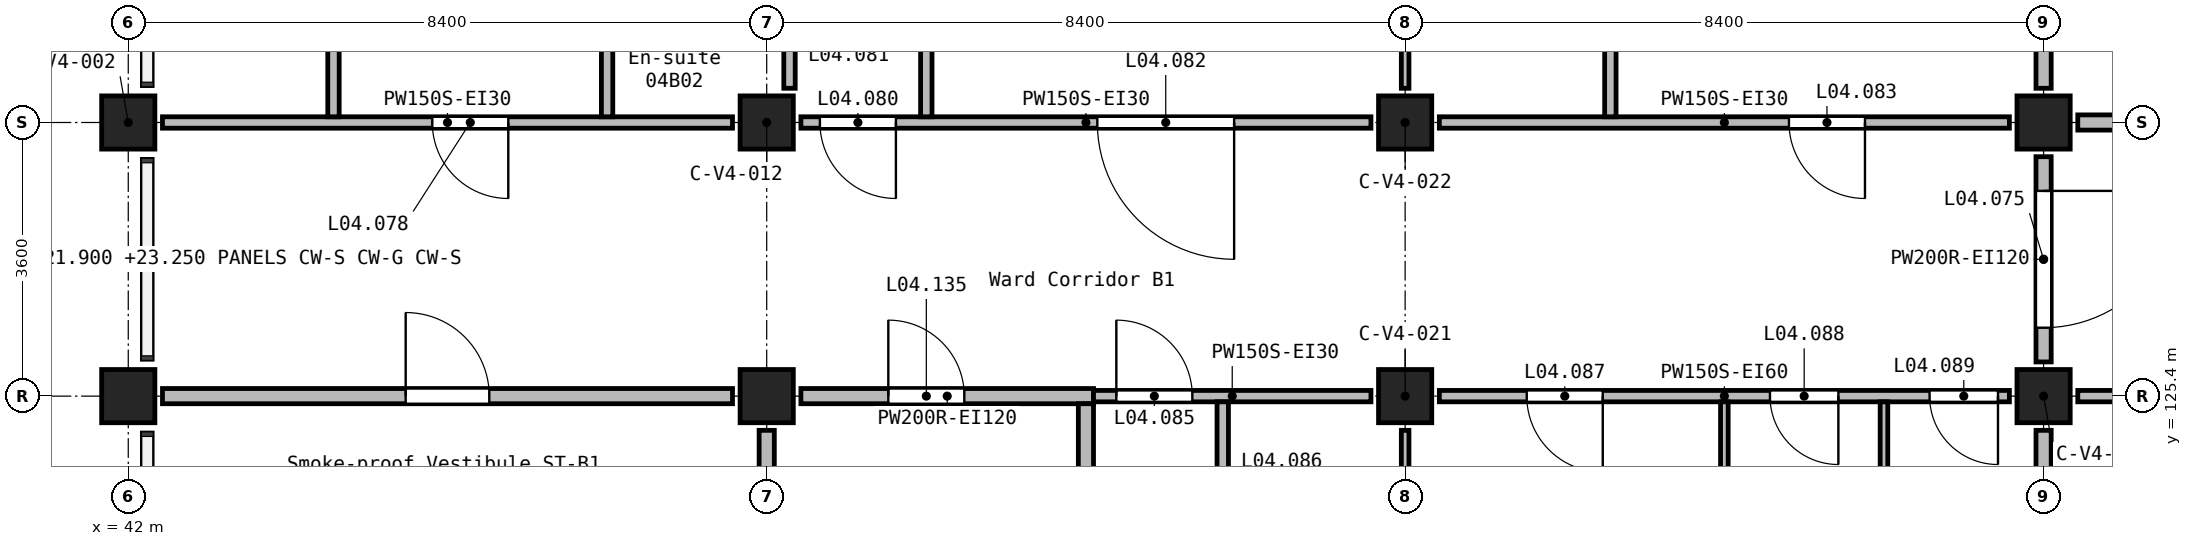
"""IFC4 building model, lengths in metres.
Left out: names, types, materials, properties, quantities, classifications, styles, units other than length and angle.
Written with IfcOpenShell. Run it as: python <this file> out.ifc"""

import sys

from ifc_helpers import new_model, si_unit, direction, frame, frame_2d, origin, origin_2d, place, context, subcontext, project, spatial, rectangle, extrude, element, fill, save


model = new_model("IFC4")
c1 = context("Model", 3, precision=1e-05, world=origin(), true_north=direction((0.0, 1.0)))
c2 = subcontext(c1, "Body", "Model", "MODEL_VIEW")
j1 = project(units=[si_unit("LENGTHUNIT", "METRE"), si_unit("PLANEANGLEUNIT", "RADIAN")], contexts=[c1])
p1 = place(None, origin())
s1 = spatial("IfcSite", under=j1, at=p1, CompositionType="ELEMENT")
p2 = place(p1, origin())
s2 = spatial("IfcBuilding", under=s1, at=p2, CompositionType="ELEMENT")
p3 = place(p2, frame((0.0, 0.0, 21.0)))
s3 = spatial("IfcBuildingStorey", under=s2, at=p3, CompositionType="ELEMENT", Elevation=21.0)
for number, where, z_axis, x_axis in (
    (1, (42.0, 125.4, 0.0), (0.0, 0.0, 1.0), (1.0, 0.0, 0.0)),
    (2, (42.0, 129.0, 0.0), (0.0, 0.0, 1.0), (1.0, 0.0, 0.0)),
    (3, (50.4, 125.4, 0.0), (0.0, 0.0, 1.0), (1.0, 0.0, 0.0)),
    (4, (50.4, 129.0, 0.0), (0.0, 0.0, 1.0), (1.0, 0.0, 0.0)),
    (5, (58.8, 125.4, 0.0), (0.0, 0.0, 1.0), (1.0, 0.0, 0.0)),
    (6, (58.8, 129.0, 0.0), (0.0, 0.0, 1.0), (1.0, 0.0, 0.0)),
    (7, (67.2, 125.4, 0.0), (0.0, 0.0, 1.0), (1.0, 0.0, 0.0)),
    (8, (67.2, 129.0, 0.0), (0.0, 0.0, 1.0), (1.0, 0.0, 0.0)),
):
    element("IfcColumn", number, at=place(p3, frame(where, z_axis=z_axis, x_axis=x_axis)), inside=s3, PredefinedType="COLUMN", context=c2, shape_type="SweptSolid", body=[
        extrude(rectangle(XDim=0.7, YDim=0.7, at=origin_2d()), origin(), (0.0, 0.0, 1.0), 3.9),
    ])
p4 = place(p3, frame((67.2, 131.425, 0.0), z_axis=(0.0, 0.0, 1.0), x_axis=(0.0, -1.0, 0.0)))
e9 = element("IfcWall", 9, at=p4, inside=s3, PredefinedType="SOLIDWALL", context=c2, shape_type="SweptSolid", body=[
    extrude(rectangle(XDim=1.975, YDim=0.2, at=frame_2d((0.988, 0.0))), origin(), (0.0, 0.0, 1.0), 3.6),
])
p5 = place(p3, frame((67.2, 128.55, 0.0), z_axis=(0.0, 0.0, 1.0), x_axis=(0.0, -1.0, 0.0)))
e10 = element("IfcWall", 10, at=p5, inside=s3, PredefinedType="SOLIDWALL", context=c2, shape_type="SweptSolid", body=[
    extrude(rectangle(XDim=2.7, YDim=0.2, at=frame_2d((1.35, 0.0))), origin(), (0.0, 0.0, 1.0), 3.6),
])
p6 = place(p5, frame((0.45, 0.0, 0.0)))
e11 = element("IfcOpeningElement", 11, at=p6, cuts=e10, PredefinedType="OPENING", context=c2, shape_type="SweptSolid", body=[
    extrude(rectangle(XDim=1.8, YDim=2.1, at=frame_2d((0.9, 1.05))), frame((0.0, 0.11, 0.0), z_axis=(0.0, -1.0, 0.0), x_axis=(1.0, 0.0, 0.0)), (0.0, 0.0, 1.0), 0.22),
])
p7 = place(p3, frame((67.2, 124.95, 0.0), z_axis=(0.0, 0.0, 1.0), x_axis=(0.0, -1.0, 0.0)))
e12 = element("IfcWall", 12, at=p7, inside=s3, PredefinedType="SOLIDWALL", context=c2, shape_type="SweptSolid", body=[
    extrude(rectangle(XDim=6.9, YDim=0.2, at=frame_2d((3.45, 0.0))), origin(), (0.0, 0.0, 1.0), 3.6),
])
p8 = place(p3, frame((42.45, 125.4, 0.0), z_axis=(0.0, 0.0, 1.0), x_axis=(1.0, 0.0, 0.0)))
e13 = element("IfcWall", 13, at=p8, inside=s3, PredefinedType="SOLIDWALL", context=c2, shape_type="SweptSolid", body=[
    extrude(rectangle(XDim=7.5, YDim=0.2, at=frame_2d((3.75, 0.0))), origin(), (0.0, 0.0, 1.0), 3.6),
])
p9 = place(p8, frame((3.2, 0.0, 0.0)))
e14 = element("IfcOpeningElement", 14, at=p9, cuts=e13, PredefinedType="OPENING", context=c2, shape_type="SweptSolid", body=[
    extrude(rectangle(XDim=1.1, YDim=2.1, at=frame_2d((0.55, 1.05))), frame((0.0, 0.11, 0.0), z_axis=(0.0, -1.0, 0.0), x_axis=(1.0, 0.0, 0.0)), (0.0, 0.0, 1.0), 0.22),
])
p10 = place(p3, frame((50.85, 125.4, 0.0), z_axis=(0.0, 0.0, 1.0), x_axis=(1.0, 0.0, 0.0)))
e15 = element("IfcWall", 15, at=p10, inside=s3, PredefinedType="SOLIDWALL", context=c2, shape_type="SweptSolid", body=[
    extrude(rectangle(XDim=3.85, YDim=0.2, at=frame_2d((1.925, 0.0))), origin(), (0.0, 0.0, 1.0), 3.6),
])
p11 = place(p10, frame((1.15, 0.0, 0.0)))
e16 = element("IfcOpeningElement", 16, at=p11, cuts=e15, PredefinedType="OPENING", context=c2, shape_type="SweptSolid", body=[
    extrude(rectangle(XDim=1.0, YDim=2.1, at=frame_2d((0.5, 1.05))), frame((0.0, 0.11, 0.0), z_axis=(0.0, -1.0, 0.0), x_axis=(1.0, 0.0, 0.0)), (0.0, 0.0, 1.0), 0.22),
])
p12 = place(p3, frame((50.4, 123.175, 0.0), z_axis=(0.0, 0.0, 1.0), x_axis=(0.0, 1.0, 0.0)))
e17 = element("IfcWall", 17, at=p12, inside=s3, PredefinedType="SOLIDWALL", context=c2, shape_type="SweptSolid", body=[
    extrude(rectangle(XDim=1.775, YDim=0.2, at=frame_2d((0.887, 0.0))), origin(), (0.0, 0.0, 1.0), 3.6),
])
p13 = place(p3, frame((67.65, 129.0, 0.0), z_axis=(0.0, 0.0, 1.0), x_axis=(1.0, 0.0, 0.0)))
e18 = element("IfcWall", 18, at=p13, inside=s3, PredefinedType="SOLIDWALL", context=c2, shape_type="SweptSolid", body=[
    extrude(rectangle(XDim=7.5, YDim=0.2, at=frame_2d((3.75, 0.0))), origin(), (0.0, 0.0, 1.0), 3.6),
])
p14 = place(p13, frame((2.85, 0.0, 0.0)))
e19 = element("IfcOpeningElement", 19, at=p14, cuts=e18, PredefinedType="OPENING", context=c2, shape_type="SweptSolid", body=[
    extrude(rectangle(XDim=1.8, YDim=2.1, at=frame_2d((0.9, 1.05))), frame((0.0, 0.11, 0.0), z_axis=(0.0, -1.0, 0.0), x_axis=(1.0, 0.0, 0.0)), (0.0, 0.0, 1.0), 0.22),
])
p15 = place(p3, frame((54.6, 118.05, 0.0), z_axis=(0.0, 0.0, 1.0), x_axis=(0.0, 1.0, 0.0)))
e20 = element("IfcWall", 20, at=p15, inside=s3, PredefinedType="SOLIDWALL", context=c2, shape_type="SweptSolid", body=[
    extrude(rectangle(XDim=7.25, YDim=0.2, at=frame_2d((3.625, 0.0))), origin(), (0.0, 0.0, 1.0), 3.6),
])
p16 = place(p3, frame((66.75, 129.0, 0.0), z_axis=(0.0, 0.0, 1.0), x_axis=(-1.0, 0.0, 0.0)))
e21 = element("IfcWall", 21, at=p16, inside=s3, PredefinedType="PARTITIONING", context=c2, shape_type="SweptSolid", body=[
    extrude(rectangle(XDim=7.5, YDim=0.15, at=frame_2d((3.75, 0.0))), origin(), (0.0, 0.0, 1.0), 3.6),
])
p17 = place(p16, frame((1.9, 0.0, 0.0)))
e22 = element("IfcOpeningElement", 22, at=p17, cuts=e21, PredefinedType="OPENING", context=c2, shape_type="SweptSolid", body=[
    extrude(rectangle(XDim=1.0, YDim=2.1, at=frame_2d((0.5, 1.05))), frame((0.0, 0.085, 0.0), z_axis=(0.0, -1.0, 0.0), x_axis=(1.0, 0.0, 0.0)), (0.0, 0.0, 1.0), 0.17),
])
p18 = place(p3, frame((58.35, 129.0, 0.0), z_axis=(0.0, 0.0, 1.0), x_axis=(-1.0, 0.0, 0.0)))
e23 = element("IfcWall", 23, at=p18, inside=s3, PredefinedType="PARTITIONING", context=c2, shape_type="SweptSolid", body=[
    extrude(rectangle(XDim=7.5, YDim=0.15, at=frame_2d((3.75, 0.0))), origin(), (0.0, 0.0, 1.0), 3.6),
])
p19 = place(p18, frame((6.25, 0.0, 0.0)))
e24 = element("IfcOpeningElement", 24, at=p19, cuts=e23, PredefinedType="OPENING", context=c2, shape_type="SweptSolid", body=[
    extrude(rectangle(XDim=1.0, YDim=2.1, at=frame_2d((0.5, 1.05))), frame((0.0, 0.085, 0.0), z_axis=(0.0, -1.0, 0.0), x_axis=(1.0, 0.0, 0.0)), (0.0, 0.0, 1.0), 0.17),
])
p20 = place(p18, frame((1.8, 0.0, 0.0)))
e25 = element("IfcOpeningElement", 25, at=p20, cuts=e23, PredefinedType="OPENING", context=c2, shape_type="SweptSolid", body=[
    extrude(rectangle(XDim=1.8, YDim=2.1, at=frame_2d((0.9, 1.05))), frame((0.0, 0.085, 0.0), z_axis=(0.0, -1.0, 0.0), x_axis=(1.0, 0.0, 0.0)), (0.0, 0.0, 1.0), 0.17),
])
p21 = place(p3, frame((49.95, 129.0, 0.0), z_axis=(0.0, 0.0, 1.0), x_axis=(-1.0, 0.0, 0.0)))
e26 = element("IfcWall", 26, at=p21, inside=s3, PredefinedType="PARTITIONING", context=c2, shape_type="SweptSolid", body=[
    extrude(rectangle(XDim=7.5, YDim=0.15, at=frame_2d((3.75, 0.0))), origin(), (0.0, 0.0, 1.0), 3.6),
])
p22 = place(p21, frame((2.95, 0.0, 0.0)))
e27 = element("IfcOpeningElement", 27, at=p22, cuts=e26, PredefinedType="OPENING", context=c2, shape_type="SweptSolid", body=[
    extrude(rectangle(XDim=1.0, YDim=2.1, at=frame_2d((0.5, 1.05))), frame((0.0, 0.085, 0.0), z_axis=(0.0, -1.0, 0.0), x_axis=(1.0, 0.0, 0.0)), (0.0, 0.0, 1.0), 0.17),
])
p23 = place(p3, frame((66.75, 125.4, 0.0), z_axis=(0.0, 0.0, 1.0), x_axis=(-1.0, 0.0, 0.0)))
e28 = element("IfcWall", 28, at=p23, inside=s3, PredefinedType="PARTITIONING", context=c2, shape_type="SweptSolid", body=[
    extrude(rectangle(XDim=7.5, YDim=0.15, at=frame_2d((3.75, 0.0))), origin(), (0.0, 0.0, 1.0), 3.6),
])
p24 = place(p23, frame((5.35, 0.0, 0.0)))
e29 = element("IfcOpeningElement", 29, at=p24, cuts=e28, PredefinedType="OPENING", context=c2, shape_type="SweptSolid", body=[
    extrude(rectangle(XDim=1.0, YDim=2.1, at=frame_2d((0.5, 1.05))), frame((0.0, 0.085, 0.0), z_axis=(0.0, -1.0, 0.0), x_axis=(1.0, 0.0, 0.0)), (0.0, 0.0, 1.0), 0.17),
])
p25 = place(p23, frame((2.25, 0.0, 0.0)))
e30 = element("IfcOpeningElement", 30, at=p25, cuts=e28, PredefinedType="OPENING", context=c2, shape_type="SweptSolid", body=[
    extrude(rectangle(XDim=0.9, YDim=2.1, at=frame_2d((0.45, 1.05))), frame((0.0, 0.085, 0.0), z_axis=(0.0, -1.0, 0.0), x_axis=(1.0, 0.0, 0.0)), (0.0, 0.0, 1.0), 0.17),
])
p26 = place(p23, frame((0.15, 0.0, 0.0)))
e31 = element("IfcOpeningElement", 31, at=p26, cuts=e28, PredefinedType="OPENING", context=c2, shape_type="SweptSolid", body=[
    extrude(rectangle(XDim=0.9, YDim=2.1, at=frame_2d((0.45, 1.05))), frame((0.0, 0.085, 0.0), z_axis=(0.0, -1.0, 0.0), x_axis=(1.0, 0.0, 0.0)), (0.0, 0.0, 1.0), 0.17),
])
p27 = place(p3, frame((67.65, 125.4, 0.0), z_axis=(0.0, 0.0, 1.0), x_axis=(1.0, 0.0, 0.0)))
e32 = element("IfcWall", 32, at=p27, inside=s3, PredefinedType="PARTITIONING", context=c2, shape_type="SweptSolid", body=[
    extrude(rectangle(XDim=7.5, YDim=0.15, at=frame_2d((3.75, 0.0))), origin(), (0.0, 0.0, 1.0), 3.6),
])
p28 = place(p27, frame((4.6, 0.0, 0.0)))
e33 = element("IfcOpeningElement", 33, at=p28, cuts=e32, PredefinedType="OPENING", context=c2, shape_type="SweptSolid", body=[
    extrude(rectangle(XDim=1.0, YDim=2.1, at=frame_2d((0.5, 1.05))), frame((0.0, 0.085, 0.0), z_axis=(0.0, -1.0, 0.0), x_axis=(1.0, 0.0, 0.0)), (0.0, 0.0, 1.0), 0.17),
])
p29 = place(p3, frame((54.7, 125.4, 0.0), z_axis=(0.0, 0.0, 1.0), x_axis=(1.0, 0.0, 0.0)))
e34 = element("IfcWall", 34, at=p29, inside=s3, PredefinedType="PARTITIONING", context=c2, shape_type="SweptSolid", body=[
    extrude(rectangle(XDim=3.65, YDim=0.15, at=frame_2d((1.825, 0.0))), origin(), (0.0, 0.0, 1.0), 3.6),
])
p30 = place(p29, frame((0.3, 0.0, 0.0)))
e35 = element("IfcOpeningElement", 35, at=p30, cuts=e34, PredefinedType="OPENING", context=c2, shape_type="SweptSolid", body=[
    extrude(rectangle(XDim=1.0, YDim=2.1, at=frame_2d((0.5, 1.05))), frame((0.0, 0.085, 0.0), z_axis=(0.0, -1.0, 0.0), x_axis=(1.0, 0.0, 0.0)), (0.0, 0.0, 1.0), 0.17),
])
for number, where, z_axis, x_axis in (
    (36, (48.3, 129.075, 0.0), (0.0, 0.0, 1.0), (0.0, 1.0, 0.0)),
    (37, (52.5, 129.075, 0.0), (0.0, 0.0, 1.0), (0.0, 1.0, 0.0)),
):
    element("IfcWall", number, at=place(p3, frame(where, z_axis=z_axis, x_axis=x_axis)), inside=s3, PredefinedType="PARTITIONING", context=c2, shape_type="SweptSolid", body=[
        extrude(rectangle(XDim=7.275, YDim=0.15, at=frame_2d((3.638, 0.0))), origin(), (0.0, 0.0, 1.0), 3.6),
    ])
p31 = place(p3, frame((44.7, 129.075, 0.0), z_axis=(0.0, 0.0, 1.0), x_axis=(0.0, 1.0, 0.0)))
e38 = element("IfcWall", 38, at=p31, inside=s3, PredefinedType="PARTITIONING", context=c2, shape_type="SweptSolid", body=[
    extrude(rectangle(XDim=3.3, YDim=0.15, at=frame_2d((1.65, 0.0))), origin(), (0.0, 0.0, 1.0), 3.6),
])
p32 = place(p31, frame((1.125, 0.0, 0.0)))
e39 = element("IfcOpeningElement", 39, at=p32, cuts=e38, PredefinedType="OPENING", context=c2, shape_type="SweptSolid", body=[
    extrude(rectangle(XDim=0.9, YDim=2.1, at=frame_2d((0.45, 1.05))), frame((0.0, 0.085, 0.0), z_axis=(0.0, -1.0, 0.0), x_axis=(1.0, 0.0, 0.0)), (0.0, 0.0, 1.0), 0.17),
])
p33 = place(p3, frame((50.7, 129.45, 0.0), z_axis=(0.0, 0.0, 1.0), x_axis=(0.0, 1.0, 0.0)))
e40 = element("IfcWall", 40, at=p33, inside=s3, PredefinedType="PARTITIONING", context=c2, shape_type="SweptSolid", body=[
    extrude(rectangle(XDim=2.925, YDim=0.15, at=frame_2d((1.462, 0.0))), origin(), (0.0, 0.0, 1.0), 3.6),
])
p34 = place(p33, frame((0.75, 0.0, 0.0)))
e41 = element("IfcOpeningElement", 41, at=p34, cuts=e40, PredefinedType="OPENING", context=c2, shape_type="SweptSolid", body=[
    extrude(rectangle(XDim=0.9, YDim=2.1, at=frame_2d((0.45, 1.05))), frame((0.0, 0.085, 0.0), z_axis=(0.0, -1.0, 0.0), x_axis=(1.0, 0.0, 0.0)), (0.0, 0.0, 1.0), 0.17),
])
p35 = place(p3, frame((56.4, 122.025, 0.0), z_axis=(0.0, 0.0, 1.0), x_axis=(0.0, 1.0, 0.0)))
e42 = element("IfcWall", 42, at=p35, inside=s3, PredefinedType="PARTITIONING", context=c2, shape_type="SweptSolid", body=[
    extrude(rectangle(XDim=3.3, YDim=0.15, at=frame_2d((1.65, 0.0))), origin(), (0.0, 0.0, 1.0), 3.6),
])
p36 = place(p35, frame((1.275, 0.0, 0.0)))
e43 = element("IfcOpeningElement", 43, at=p36, cuts=e42, PredefinedType="OPENING", context=c2, shape_type="SweptSolid", body=[
    extrude(rectangle(XDim=0.9, YDim=2.1, at=frame_2d((0.45, 1.05))), frame((0.0, 0.085, 0.0), z_axis=(0.0, -1.0, 0.0), x_axis=(1.0, 0.0, 0.0)), (0.0, 0.0, 1.0), 0.17),
])
p37 = place(p3, frame((61.5, 129.075, 0.0), z_axis=(0.0, 0.0, 1.0), x_axis=(0.0, 1.0, 0.0)))
e44 = element("IfcWall", 44, at=p37, inside=s3, PredefinedType="PARTITIONING", context=c2, shape_type="SweptSolid", body=[
    extrude(rectangle(XDim=3.3, YDim=0.15, at=frame_2d((1.65, 0.0))), origin(), (0.0, 0.0, 1.0), 3.6),
])
p38 = place(p37, frame((1.125, 0.0, 0.0)))
e45 = element("IfcOpeningElement", 45, at=p38, cuts=e44, PredefinedType="OPENING", context=c2, shape_type="SweptSolid", body=[
    extrude(rectangle(XDim=0.9, YDim=2.1, at=frame_2d((0.45, 1.05))), frame((0.0, 0.085, 0.0), z_axis=(0.0, -1.0, 0.0), x_axis=(1.0, 0.0, 0.0)), (0.0, 0.0, 1.0), 0.17),
])
for number, where, z_axis, x_axis in (
    (46, (63.0, 118.05, 0.0), (0.0, 0.0, 1.0), (0.0, 1.0, 0.0)),
    (47, (65.1, 118.05, 0.0), (0.0, 0.0, 1.0), (0.0, 1.0, 0.0)),
):
    element("IfcWall", number, at=place(p3, frame(where, z_axis=z_axis, x_axis=x_axis)), inside=s3, PredefinedType="PARTITIONING", context=c2, shape_type="SweptSolid", body=[
        extrude(rectangle(XDim=7.275, YDim=0.1, at=frame_2d((3.637, 0.0))), origin(), (0.0, 0.0, 1.0), 3.6),
    ])
p39 = place(p3, frame((58.8, 122.175, 0.0), z_axis=(0.0, 0.0, 1.0), x_axis=(0.0, 1.0, 0.0)))
e48 = element("IfcWall", 48, at=p39, inside=s3, PredefinedType="PARTITIONING", context=c2, shape_type="SweptSolid", body=[
    extrude(rectangle(XDim=2.775, YDim=0.1, at=frame_2d((1.387, 0.0))), origin(), (0.0, 0.0, 1.0), 3.6),
])
p40 = place(p3, frame((58.8, 129.45, 0.0), z_axis=(0.0, 0.0, 1.0), x_axis=(0.0, 1.0, 0.0)))
e49 = element("IfcWall", 49, at=p40, inside=s3, PredefinedType="PARTITIONING", context=c2, shape_type="SweptSolid", body=[
    extrude(rectangle(XDim=2.775, YDim=0.1, at=frame_2d((1.388, 0.0))), origin(), (0.0, 0.0, 1.0), 3.6),
])
p41 = place(p6, origin())
e50 = element("IfcDoor", 50, at=p41, inside=s3, OperationType="DOUBLE_DOOR_SINGLE_SWING", PredefinedType="DOOR", context=c2, shape_type="SweptSolid", body=[
    extrude(rectangle(XDim=1.8, YDim=2.1, at=frame_2d((0.9, 1.05))), frame((0.0, 0.025, 0.0), z_axis=(0.0, -1.0, 0.0), x_axis=(1.0, 0.0, 0.0)), (0.0, 0.0, 1.0), 0.05),
])
fill(e11, e50)
p42 = place(p22, frame((1.0, 0.0, 0.0), z_axis=(0.0, 0.0, 1.0), x_axis=(-1.0, 0.0, 0.0)))
e51 = element("IfcDoor", 51, at=p42, inside=s3, OperationType="SINGLE_SWING_RIGHT", PredefinedType="DOOR", context=c2, shape_type="SweptSolid", body=[
    extrude(rectangle(XDim=1.0, YDim=2.1, at=frame_2d((0.5, 1.05))), frame((0.0, 0.025, 0.0), z_axis=(0.0, -1.0, 0.0), x_axis=(1.0, 0.0, 0.0)), (0.0, 0.0, 1.0), 0.05),
])
fill(e27, e51)
p43 = place(p19, frame((1.0, 0.0, 0.0), z_axis=(0.0, 0.0, 1.0), x_axis=(-1.0, 0.0, 0.0)))
e52 = element("IfcDoor", 52, at=p43, inside=s3, OperationType="SINGLE_SWING_LEFT", PredefinedType="DOOR", context=c2, shape_type="SweptSolid", body=[
    extrude(rectangle(XDim=1.0, YDim=2.1, at=frame_2d((0.5, 1.05))), frame((0.0, 0.025, 0.0), z_axis=(0.0, -1.0, 0.0), x_axis=(1.0, 0.0, 0.0)), (0.0, 0.0, 1.0), 0.05),
])
fill(e24, e52)
p44 = place(p20, frame((1.8, 0.0, 0.0), z_axis=(0.0, 0.0, 1.0), x_axis=(-1.0, 0.0, 0.0)))
e53 = element("IfcDoor", 53, at=p44, inside=s3, OperationType="DOUBLE_DOOR_SINGLE_SWING", PredefinedType="DOOR", context=c2, shape_type="SweptSolid", body=[
    extrude(rectangle(XDim=1.8, YDim=2.1, at=frame_2d((0.9, 1.05))), frame((0.0, 0.025, 0.0), z_axis=(0.0, -1.0, 0.0), x_axis=(1.0, 0.0, 0.0)), (0.0, 0.0, 1.0), 0.05),
])
fill(e25, e53)
p45 = place(p17, frame((1.0, 0.0, 0.0), z_axis=(0.0, 0.0, 1.0), x_axis=(-1.0, 0.0, 0.0)))
e54 = element("IfcDoor", 54, at=p45, inside=s3, OperationType="SINGLE_SWING_RIGHT", PredefinedType="DOOR", context=c2, shape_type="SweptSolid", body=[
    extrude(rectangle(XDim=1.0, YDim=2.1, at=frame_2d((0.5, 1.05))), frame((0.0, 0.025, 0.0), z_axis=(0.0, -1.0, 0.0), x_axis=(1.0, 0.0, 0.0)), (0.0, 0.0, 1.0), 0.05),
])
fill(e22, e54)
p46 = place(p30, frame((1.0, 0.0, 0.0), z_axis=(0.0, 0.0, 1.0), x_axis=(-1.0, 0.0, 0.0)))
e55 = element("IfcDoor", 55, at=p46, inside=s3, OperationType="SINGLE_SWING_RIGHT", PredefinedType="DOOR", context=c2, shape_type="SweptSolid", body=[
    extrude(rectangle(XDim=1.0, YDim=2.1, at=frame_2d((0.5, 1.05))), frame((0.0, 0.025, 0.0), z_axis=(0.0, -1.0, 0.0), x_axis=(1.0, 0.0, 0.0)), (0.0, 0.0, 1.0), 0.05),
])
fill(e35, e55)
p47 = place(p24, origin())
e56 = element("IfcDoor", 56, at=p47, inside=s3, OperationType="SINGLE_SWING_RIGHT", PredefinedType="DOOR", context=c2, shape_type="SweptSolid", body=[
    extrude(rectangle(XDim=1.0, YDim=2.1, at=frame_2d((0.5, 1.05))), frame((0.0, 0.025, 0.0), z_axis=(0.0, -1.0, 0.0), x_axis=(1.0, 0.0, 0.0)), (0.0, 0.0, 1.0), 0.05),
])
fill(e29, e56)
p48 = place(p25, origin())
e57 = element("IfcDoor", 57, at=p48, inside=s3, OperationType="SINGLE_SWING_LEFT", PredefinedType="DOOR", context=c2, shape_type="SweptSolid", body=[
    extrude(rectangle(XDim=0.9, YDim=2.1, at=frame_2d((0.45, 1.05))), frame((0.0, 0.025, 0.0), z_axis=(0.0, -1.0, 0.0), x_axis=(1.0, 0.0, 0.0)), (0.0, 0.0, 1.0), 0.05),
])
fill(e30, e57)
p49 = place(p26, origin())
e58 = element("IfcDoor", 58, at=p49, inside=s3, OperationType="SINGLE_SWING_LEFT", PredefinedType="DOOR", context=c2, shape_type="SweptSolid", body=[
    extrude(rectangle(XDim=0.9, YDim=2.1, at=frame_2d((0.45, 1.05))), frame((0.0, 0.025, 0.0), z_axis=(0.0, -1.0, 0.0), x_axis=(1.0, 0.0, 0.0)), (0.0, 0.0, 1.0), 0.05),
])
fill(e31, e58)
p50 = place(p11, frame((1.0, 0.0, 0.0), z_axis=(0.0, 0.0, 1.0), x_axis=(-1.0, 0.0, 0.0)))
e59 = element("IfcDoor", 59, at=p50, inside=s3, OperationType="SINGLE_SWING_RIGHT", PredefinedType="DOOR", context=c2, shape_type="SweptSolid", body=[
    extrude(rectangle(XDim=1.0, YDim=2.1, at=frame_2d((0.5, 1.05))), frame((0.0, 0.025, 0.0), z_axis=(0.0, -1.0, 0.0), x_axis=(1.0, 0.0, 0.0)), (0.0, 0.0, 1.0), 0.05),
])
fill(e16, e59)
p51 = place(p9, frame((1.1, 0.0, 0.0), z_axis=(0.0, 0.0, 1.0), x_axis=(-1.0, 0.0, 0.0)))
e60 = element("IfcDoor", 60, at=p51, inside=s3, OperationType="SINGLE_SWING_LEFT", PredefinedType="DOOR", context=c2, shape_type="SweptSolid", body=[
    extrude(rectangle(XDim=1.1, YDim=2.1, at=frame_2d((0.55, 1.05))), frame((0.0, 0.025, 0.0), z_axis=(0.0, -1.0, 0.0), x_axis=(1.0, 0.0, 0.0)), (0.0, 0.0, 1.0), 0.05),
])
fill(e14, e60)
save(model, sys.argv[1])
